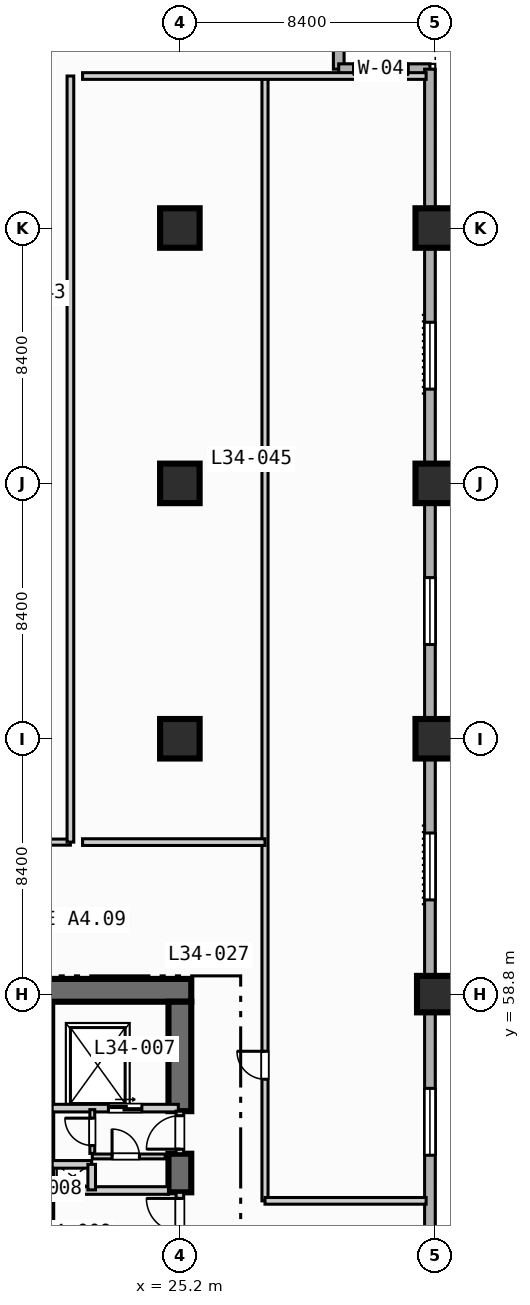
"""IFC4 building model, lengths in metres.
Left out: names, types, materials, properties, quantities, classifications, styles, units other than length and angle.
Written with IfcOpenShell. Run it as: python <this file> out.ifc"""

import sys

from ifc_helpers import new_model, si_unit, direction, frame, frame_2d, origin, origin_2d, place, context, subcontext, project, spatial, rectangle, extrude, element, fill, save


model = new_model("IFC4")
c1 = context("Model", 3, precision=1e-05, world=origin(), true_north=direction((0.0, 1.0)))
c2 = subcontext(c1, "Body", "Model", "MODEL_VIEW")
j1 = project(units=[si_unit("LENGTHUNIT", "METRE"), si_unit("PLANEANGLEUNIT", "RADIAN")], contexts=[c1])
p1 = place(None, origin())
s1 = spatial("IfcSite", under=j1, at=p1, CompositionType="ELEMENT")
p2 = place(p1, origin())
s2 = spatial("IfcBuilding", under=s1, at=p2, CompositionType="ELEMENT")
p3 = place(p2, frame((0.0, 0.0, 141.8)))
s3 = spatial("IfcBuildingStorey", under=s2, at=p3, CompositionType="ELEMENT", Elevation=141.8)
p4 = place(p3, frame((20.5, 58.925, 0.0), z_axis=(0.0, 0.0, 1.0), x_axis=(1.0, 0.0, 0.0)))
e1 = element("IfcWall", 1, at=p4, inside=s3, PredefinedType="SHEAR", context=c2, shape_type="SweptSolid", body=[
    extrude(rectangle(XDim=5.075, YDim=0.75, at=frame_2d((2.538, 0.0))), origin(), (0.0, 0.0, 1.0), 3.55),
])
p5 = place(p3, frame((25.2, 52.28, 0.0), z_axis=(0.0, 0.0, 1.0), x_axis=(0.0, 1.0, 0.0)))
e2 = element("IfcWall", 2, at=p5, inside=s3, PredefinedType="SHEAR", context=c2, shape_type="SweptSolid", body=[
    extrude(rectangle(XDim=1.27, YDim=0.75, at=frame_2d((0.635, 0.0))), origin(), (0.0, 0.0, 1.0), 3.55),
])
p6 = place(p3, frame((25.2, 54.95, 0.0), z_axis=(0.0, 0.0, 1.0), x_axis=(0.0, 1.0, 0.0)))
e3 = element("IfcWall", 3, at=p6, inside=s3, PredefinedType="SHEAR", context=c2, shape_type="SweptSolid", body=[
    extrude(rectangle(XDim=3.6, YDim=0.75, at=frame_2d((1.8, 0.0))), origin(), (0.0, 0.0, 1.0), 3.55),
])
for number, where, z_axis, x_axis in (
    (4, (25.2, 67.2, 0.0), (0.0, 0.0, 1.0), (1.0, 0.0, 0.0)),
    (5, (25.2, 75.6, 0.0), (0.0, 0.0, 1.0), (1.0, 0.0, 0.0)),
    (6, (25.2, 84.0, 0.0), (0.0, 0.0, 1.0), (1.0, 0.0, 0.0)),
):
    element("IfcColumn", number, at=place(p3, frame(where, z_axis=z_axis, x_axis=x_axis)), inside=s3, PredefinedType="COLUMN", context=c2, shape_type="SweptSolid", body=[
        extrude(rectangle(XDim=1.3, YDim=1.3, at=origin_2d()), origin(), (0.0, 0.0, 1.0), 3.8),
    ])
p7 = place(p3, frame((33.6, 58.8, 0.0), z_axis=(0.0, 0.0, 1.0), x_axis=(1.0, 0.0, 0.0)))
e7 = element("IfcColumn", 7, at=p7, inside=s3, PredefinedType="COLUMN", context=c2, shape_type="SweptSolid", body=[
    extrude(rectangle(XDim=1.2, YDim=1.2, at=origin_2d()), origin(), (0.0, 0.0, 1.0), 3.8),
])
for number, where, z_axis, x_axis in (
    (8, (33.6, 67.2, 0.0), (0.0, 0.0, 1.0), (1.0, 0.0, 0.0)),
    (9, (33.6, 75.6, 0.0), (0.0, 0.0, 1.0), (1.0, 0.0, 0.0)),
    (10, (33.6, 84.0, 0.0), (0.0, 0.0, 1.0), (1.0, 0.0, 0.0)),
):
    element("IfcColumn", number, at=place(p3, frame(where, z_axis=z_axis, x_axis=x_axis)), inside=s3, PredefinedType="COLUMN", context=c2, shape_type="SweptSolid", body=[
        extrude(rectangle(XDim=1.3, YDim=1.3, at=origin_2d()), origin(), (0.0, 0.0, 1.0), 3.8),
    ])
p8 = place(p3, frame((30.425, 92.225, 0.0), z_axis=(0.0, 0.0, 1.0), x_axis=(0.0, -1.0, 0.0)))
e11 = element("IfcWall", 11, at=p8, inside=s3, PredefinedType="STANDARD", context=c2, shape_type="SweptSolid", body=[
    extrude(rectangle(XDim=3.0, YDim=0.35, at=frame_2d((1.5, 0.0))), origin(), (0.0, 0.0, 1.0), 3.55),
])
p9 = place(p3, frame((30.425, 89.225, 0.0), z_axis=(0.0, 0.0, 1.0), x_axis=(1.0, 0.0, 0.0)))
e12 = element("IfcWall", 12, at=p9, inside=s3, PredefinedType="STANDARD", context=c2, shape_type="SweptSolid", body=[
    extrude(rectangle(XDim=3.0, YDim=0.35, at=frame_2d((1.5, 0.0))), origin(), (0.0, 0.0, 1.0), 3.55),
])
p10 = place(p9, frame((0.488, 0.0, 0.85)))
e13 = element("IfcOpeningElement", 13, at=p10, cuts=e12, PredefinedType="OPENING", context=c2, shape_type="SweptSolid", body=[
    extrude(rectangle(XDim=1.8, YDim=1.8, at=frame_2d((0.9, 0.9))), frame((0.0, 0.185, 0.0), z_axis=(0.0, -1.0, 0.0), x_axis=(1.0, 0.0, 0.0)), (0.0, 0.0, 1.0), 0.37),
])
p11 = place(p3, frame((33.425, 89.225, 0.0), z_axis=(0.0, 0.0, 1.0), x_axis=(0.0, -1.0, 0.0)))
e14 = element("IfcWall", 14, at=p11, inside=s3, PredefinedType="STANDARD", context=c2, shape_type="SweptSolid", body=[
    extrude(rectangle(XDim=55.8, YDim=0.35, at=frame_2d((27.9, 0.0))), origin(), (0.0, 0.0, 1.0), 3.55),
])
p12 = place(p11, frame((50.325, 0.0, 0.85)))
e15 = element("IfcOpeningElement", 15, at=p12, cuts=e14, PredefinedType="OPENING", context=c2, shape_type="SweptSolid", body=[
    extrude(rectangle(XDim=2.2, YDim=1.8, at=frame_2d((1.1, 0.9))), frame((0.0, 0.185, 0.0), z_axis=(0.0, -1.0, 0.0), x_axis=(1.0, 0.0, 0.0)), (0.0, 0.0, 1.0), 0.37),
])
p13 = place(p11, frame((33.525, 0.0, 0.85)))
e16 = element("IfcOpeningElement", 16, at=p13, cuts=e14, PredefinedType="OPENING", context=c2, shape_type="SweptSolid", body=[
    extrude(rectangle(XDim=2.2, YDim=1.8, at=frame_2d((1.1, 0.9))), frame((0.0, 0.185, 0.0), z_axis=(0.0, -1.0, 0.0), x_axis=(1.0, 0.0, 0.0)), (0.0, 0.0, 1.0), 0.37),
])
p14 = place(p11, frame((25.125, 0.0, 0.85)))
e17 = element("IfcOpeningElement", 17, at=p14, cuts=e14, PredefinedType="OPENING", context=c2, shape_type="SweptSolid", body=[
    extrude(rectangle(XDim=2.2, YDim=1.8, at=frame_2d((1.1, 0.9))), frame((0.0, 0.185, 0.0), z_axis=(0.0, -1.0, 0.0), x_axis=(1.0, 0.0, 0.0)), (0.0, 0.0, 1.0), 0.37),
])
p15 = place(p11, frame((16.725, 0.0, 0.85)))
e18 = element("IfcOpeningElement", 18, at=p15, cuts=e14, PredefinedType="OPENING", context=c2, shape_type="SweptSolid", body=[
    extrude(rectangle(XDim=2.2, YDim=1.8, at=frame_2d((1.1, 0.9))), frame((0.0, 0.185, 0.0), z_axis=(0.0, -1.0, 0.0), x_axis=(1.0, 0.0, 0.0)), (0.0, 0.0, 1.0), 0.37),
])
p16 = place(p11, frame((8.325, 0.0, 0.85)))
e19 = element("IfcOpeningElement", 19, at=p16, cuts=e14, PredefinedType="OPENING", context=c2, shape_type="SweptSolid", body=[
    extrude(rectangle(XDim=2.2, YDim=1.8, at=frame_2d((1.1, 0.9))), frame((0.0, 0.185, 0.0), z_axis=(0.0, -1.0, 0.0), x_axis=(1.0, 0.0, 0.0)), (0.0, 0.0, 1.0), 0.37),
])
p17 = place(p3, frame((25.2, 50.8, 0.0), z_axis=(0.0, 0.0, 1.0), x_axis=(0.0, 1.0, 0.0)))
e20 = element("IfcWall", 20, at=p17, inside=s3, PredefinedType="SOLIDWALL", context=c2, shape_type="SweptSolid", body=[
    extrude(rectangle(XDim=1.48, YDim=0.25, at=frame_2d((0.74, 0.0))), origin(), (0.0, 0.0, 1.0), 3.55),
])
p18 = place(p17, frame((0.18, 0.0, 0.0)))
e21 = element("IfcOpeningElement", 21, at=p18, cuts=e20, PredefinedType="OPENING", context=c2, shape_type="SweptSolid", body=[
    extrude(rectangle(XDim=1.1, YDim=2.15, at=frame_2d((0.55, 1.075))), frame((0.0, 0.135, 0.0), z_axis=(0.0, -1.0, 0.0), x_axis=(1.0, 0.0, 0.0)), (0.0, 0.0, 1.0), 0.27),
])
p19 = place(p3, frame((21.0, 52.34, 0.0), z_axis=(0.0, 0.0, 1.0), x_axis=(1.0, 0.0, 0.0)))
e22 = element("IfcWall", 22, at=p19, inside=s3, PredefinedType="SOLIDWALL", context=c2, shape_type="SweptSolid", body=[
    extrude(rectangle(XDim=3.825, YDim=0.25, at=frame_2d((1.913, 0.0))), origin(), (0.0, 0.0, 1.0), 3.55),
])
p20 = place(p3, frame((21.0, 55.05, 0.0), z_axis=(0.0, 0.0, 1.0), x_axis=(1.0, 0.0, 0.0)))
e23 = element("IfcWall", 23, at=p20, inside=s3, PredefinedType="SOLIDWALL", context=c2, shape_type="SweptSolid", body=[
    extrude(rectangle(XDim=4.15, YDim=0.25, at=frame_2d((2.075, 0.0))), origin(), (0.0, 0.0, 1.0), 3.55),
])
p21 = place(p20, frame((1.85, 0.0, 0.0)))
e24 = element("IfcOpeningElement", 24, at=p21, cuts=e23, PredefinedType="OPENING", context=c2, shape_type="SweptSolid", body=[
    extrude(rectangle(XDim=1.1, YDim=2.15, at=frame_2d((0.55, 1.075))), frame((0.0, 0.135, 0.0), z_axis=(0.0, -1.0, 0.0), x_axis=(1.0, 0.0, 0.0)), (0.0, 0.0, 1.0), 0.27),
])
p22 = place(p3, frame((25.2, 53.55, 0.0), z_axis=(0.0, 0.0, 1.0), x_axis=(0.0, 1.0, 0.0)))
e25 = element("IfcWall", 25, at=p22, inside=s3, PredefinedType="SOLIDWALL", context=c2, shape_type="SweptSolid", body=[
    extrude(rectangle(XDim=1.4, YDim=0.25, at=frame_2d((0.7, 0.0))), origin(), (0.0, 0.0, 1.0), 3.55),
])
p23 = place(p22, frame((0.15, 0.0, 0.0)))
e26 = element("IfcOpeningElement", 26, at=p23, cuts=e25, PredefinedType="OPENING", context=c2, shape_type="SweptSolid", body=[
    extrude(rectangle(XDim=1.1, YDim=2.15, at=frame_2d((0.55, 1.075))), frame((0.0, 0.135, 0.0), z_axis=(0.0, -1.0, 0.0), x_axis=(1.0, 0.0, 0.0)), (0.0, 0.0, 1.0), 0.27),
])
p24 = place(p3, frame((21.0, 53.2, 0.0), z_axis=(0.0, 0.0, 1.0), x_axis=(1.0, 0.0, 0.0)))
e27 = element("IfcWall", 27, at=p24, inside=s3, PredefinedType="SOLIDWALL", context=c2, shape_type="SweptSolid", body=[
    extrude(rectangle(XDim=1.3, YDim=0.25, at=frame_2d((0.65, 0.0))), origin(), (0.0, 0.0, 1.0), 3.55),
])
p25 = place(p3, frame((22.3, 52.36, 0.0), z_axis=(0.0, 0.0, 1.0), x_axis=(0.0, 1.0, 0.0)))
e28 = element("IfcWall", 28, at=p25, inside=s3, PredefinedType="SOLIDWALL", context=c2, shape_type="SweptSolid", body=[
    extrude(rectangle(XDim=0.84, YDim=0.25, at=frame_2d((0.42, 0.0))), origin(), (0.0, 0.0, 1.0), 3.55),
])
p26 = place(p3, frame((22.32, 53.56, 0.0), z_axis=(0.0, 0.0, 1.0), x_axis=(0.0, 1.0, 0.0)))
e29 = element("IfcWall", 29, at=p26, inside=s3, PredefinedType="PARTITIONING", context=c2, shape_type="SweptSolid", body=[
    extrude(rectangle(XDim=1.44, YDim=0.16, at=frame_2d((0.72, 0.0))), origin(), (0.0, 0.0, 1.0), 3.55),
])
p27 = place(p26, frame((0.26, 0.0, 0.0)))
e30 = element("IfcOpeningElement", 30, at=p27, cuts=e29, PredefinedType="OPENING", context=c2, shape_type="SweptSolid", body=[
    extrude(rectangle(XDim=0.9, YDim=2.1, at=frame_2d((0.45, 1.05))), frame((0.0, 0.09, 0.0), z_axis=(0.0, -1.0, 0.0), x_axis=(1.0, 0.0, 0.0)), (0.0, 0.0, 1.0), 0.18),
])
p28 = place(p3, frame((22.32, 53.46, 0.0), z_axis=(0.0, 0.0, 1.0), x_axis=(1.0, 0.0, 0.0)))
e31 = element("IfcWall", 31, at=p28, inside=s3, PredefinedType="PARTITIONING", context=c2, shape_type="SweptSolid", body=[
    extrude(rectangle(XDim=2.4, YDim=0.16, at=frame_2d((1.2, 0.0))), origin(), (0.0, 0.0, 1.0), 3.55),
])
p29 = place(p28, frame((0.65, 0.0, 0.0)))
e32 = element("IfcOpeningElement", 32, at=p29, cuts=e31, PredefinedType="OPENING", context=c2, shape_type="SweptSolid", body=[
    extrude(rectangle(XDim=0.9, YDim=2.1, at=frame_2d((0.45, 1.05))), frame((0.0, 0.09, 0.0), z_axis=(0.0, -1.0, 0.0), x_axis=(1.0, 0.0, 0.0)), (0.0, 0.0, 1.0), 0.18),
])
p30 = place(p3, frame((3.4, 63.8, 0.0), z_axis=(0.0, 0.0, 1.0), x_axis=(1.0, 0.0, 0.0)))
e33 = element("IfcWall", 33, at=p30, inside=s3, PredefinedType="PARTITIONING", context=c2, shape_type="SweptSolid", body=[
    extrude(rectangle(XDim=18.2, YDim=0.2, at=frame_2d((9.1, 0.0))), origin(), (0.0, 0.0, 1.0), 3.55),
])
p31 = place(p30, frame((4.05, 0.0, 0.0)))
e34 = element("IfcOpeningElement", 34, at=p31, cuts=e33, PredefinedType="OPENING", context=c2, shape_type="SweptSolid", body=[
    extrude(rectangle(XDim=1.0, YDim=2.15, at=frame_2d((0.5, 1.075))), frame((0.0, 0.11, 0.0), z_axis=(0.0, -1.0, 0.0), x_axis=(1.0, 0.0, 0.0)), (0.0, 0.0, 1.0), 0.22),
])
p32 = place(p3, frame((21.6, 63.8, 0.0), z_axis=(0.0, 0.0, 1.0), x_axis=(0.0, 1.0, 0.0)))
e35 = element("IfcWall", 35, at=p32, inside=s3, PredefinedType="PARTITIONING", context=c2, shape_type="SweptSolid", body=[
    extrude(rectangle(XDim=25.2, YDim=0.22, at=frame_2d((12.6, 0.0))), origin(), (0.0, 0.0, 1.0), 3.55),
])
p33 = place(p3, frame((28.0, 52.0, 0.0), z_axis=(0.0, 0.0, 1.0), x_axis=(0.0, 1.0, 0.0)))
e36 = element("IfcWall", 36, at=p33, inside=s3, PredefinedType="PARTITIONING", context=c2, shape_type="SweptSolid", body=[
    extrude(rectangle(XDim=37.0, YDim=0.2, at=frame_2d((18.5, 0.0))), origin(), (0.0, 0.0, 1.0), 3.55),
])
p34 = place(p33, frame((4.0, 0.0, 0.0)))
e37 = element("IfcOpeningElement", 37, at=p34, cuts=e36, PredefinedType="OPENING", context=c2, shape_type="SweptSolid", body=[
    extrude(rectangle(XDim=0.92, YDim=2.1, at=frame_2d((0.46, 1.05))), frame((0.0, 0.11, 0.0), z_axis=(0.0, -1.0, 0.0), x_axis=(1.0, 0.0, 0.0)), (0.0, 0.0, 1.0), 0.22),
])
p35 = place(p3, frame((28.0, 52.0, 0.0), z_axis=(0.0, 0.0, 1.0), x_axis=(1.0, 0.0, 0.0)))
e38 = element("IfcWall", 38, at=p35, inside=s3, PredefinedType="PARTITIONING", context=c2, shape_type="SweptSolid", body=[
    extrude(rectangle(XDim=5.3, YDim=0.22, at=frame_2d((2.65, 0.0))), origin(), (0.0, 0.0, 1.0), 3.55),
])
p36 = place(p3, frame((22.0, 89.0, 0.0), z_axis=(0.0, 0.0, 1.0), x_axis=(1.0, 0.0, 0.0)))
e39 = element("IfcWall", 39, at=p36, inside=s3, PredefinedType="PARTITIONING", context=c2, shape_type="SweptSolid", body=[
    extrude(rectangle(XDim=11.3, YDim=0.22, at=frame_2d((5.65, 0.0))), origin(), (0.0, 0.0, 1.0), 3.55),
])
p37 = place(p3, frame((22.0, 63.8, 0.0), z_axis=(0.0, 0.0, 1.0), x_axis=(1.0, 0.0, 0.0)))
e40 = element("IfcWall", 40, at=p37, inside=s3, PredefinedType="PARTITIONING", context=c2, shape_type="SweptSolid", body=[
    extrude(rectangle(XDim=6.0, YDim=0.22, at=frame_2d((3.0, 0.0))), origin(), (0.0, 0.0, 1.0), 3.55),
])
p38 = place(p10, origin())
e41 = element("IfcWindow", 41, at=p38, inside=s3, PartitioningType="SINGLE_PANEL", PredefinedType="WINDOW", context=c2, shape_type="SweptSolid", body=[
    extrude(rectangle(XDim=1.8, YDim=1.8, at=frame_2d((0.9, 0.9))), frame((0.0, 0.03, 0.0), z_axis=(0.0, -1.0, 0.0), x_axis=(1.0, 0.0, 0.0)), (0.0, 0.0, 1.0), 0.06),
])
fill(e13, e41)
p39 = place(p13, origin())
e42 = element("IfcWindow", 42, at=p39, inside=s3, PartitioningType="SINGLE_PANEL", PredefinedType="WINDOW", context=c2, shape_type="SweptSolid", body=[
    extrude(rectangle(XDim=2.2, YDim=1.8, at=frame_2d((1.1, 0.9))), frame((0.0, 0.03, 0.0), z_axis=(0.0, -1.0, 0.0), x_axis=(1.0, 0.0, 0.0)), (0.0, 0.0, 1.0), 0.06),
])
fill(e16, e42)
p40 = place(p14, origin())
e43 = element("IfcWindow", 43, at=p40, inside=s3, PartitioningType="SINGLE_PANEL", PredefinedType="WINDOW", context=c2, shape_type="SweptSolid", body=[
    extrude(rectangle(XDim=2.2, YDim=1.8, at=frame_2d((1.1, 0.9))), frame((0.0, 0.03, 0.0), z_axis=(0.0, -1.0, 0.0), x_axis=(1.0, 0.0, 0.0)), (0.0, 0.0, 1.0), 0.06),
])
fill(e17, e43)
p41 = place(p15, origin())
e44 = element("IfcWindow", 44, at=p41, inside=s3, PartitioningType="SINGLE_PANEL", PredefinedType="WINDOW", context=c2, shape_type="SweptSolid", body=[
    extrude(rectangle(XDim=2.2, YDim=1.8, at=frame_2d((1.1, 0.9))), frame((0.0, 0.03, 0.0), z_axis=(0.0, -1.0, 0.0), x_axis=(1.0, 0.0, 0.0)), (0.0, 0.0, 1.0), 0.06),
])
fill(e18, e44)
p42 = place(p16, origin())
e45 = element("IfcWindow", 45, at=p42, inside=s3, PartitioningType="SINGLE_PANEL", PredefinedType="WINDOW", context=c2, shape_type="SweptSolid", body=[
    extrude(rectangle(XDim=2.2, YDim=1.8, at=frame_2d((1.1, 0.9))), frame((0.0, 0.03, 0.0), z_axis=(0.0, -1.0, 0.0), x_axis=(1.0, 0.0, 0.0)), (0.0, 0.0, 1.0), 0.06),
])
fill(e19, e45)
p43 = place(p18, origin())
e46 = element("IfcDoor", 46, at=p43, inside=s3, OperationType="SINGLE_SWING_RIGHT", PredefinedType="DOOR", context=c2, shape_type="SweptSolid", body=[
    extrude(rectangle(XDim=1.1, YDim=2.15, at=frame_2d((0.55, 1.075))), frame((0.0, 0.025, 0.0), z_axis=(0.0, -1.0, 0.0), x_axis=(1.0, 0.0, 0.0)), (0.0, 0.0, 1.0), 0.05),
])
fill(e21, e46)
p44 = place(p21, origin())
e47 = element("IfcDoor", 47, at=p44, inside=s3, OperationType="SLIDING_TO_LEFT", PredefinedType="DOOR", context=c2, shape_type="SweptSolid", body=[
    extrude(rectangle(XDim=1.1, YDim=2.15, at=frame_2d((0.55, 1.075))), frame((0.0, 0.025, 0.0), z_axis=(0.0, -1.0, 0.0), x_axis=(1.0, 0.0, 0.0)), (0.0, 0.0, 1.0), 0.05),
])
fill(e24, e47)
p45 = place(p23, origin())
e48 = element("IfcDoor", 48, at=p45, inside=s3, OperationType="SINGLE_SWING_LEFT", PredefinedType="DOOR", context=c2, shape_type="SweptSolid", body=[
    extrude(rectangle(XDim=1.1, YDim=2.15, at=frame_2d((0.55, 1.075))), frame((0.0, 0.025, 0.0), z_axis=(0.0, -1.0, 0.0), x_axis=(1.0, 0.0, 0.0)), (0.0, 0.0, 1.0), 0.05),
])
fill(e26, e48)
p46 = place(p27, origin())
e49 = element("IfcDoor", 49, at=p46, inside=s3, OperationType="SINGLE_SWING_RIGHT", PredefinedType="DOOR", context=c2, shape_type="SweptSolid", body=[
    extrude(rectangle(XDim=0.9, YDim=2.1, at=frame_2d((0.45, 1.05))), frame((0.0, 0.025, 0.0), z_axis=(0.0, -1.0, 0.0), x_axis=(1.0, 0.0, 0.0)), (0.0, 0.0, 1.0), 0.05),
])
fill(e30, e49)
p47 = place(p29, origin())
e50 = element("IfcDoor", 50, at=p47, inside=s3, OperationType="SINGLE_SWING_LEFT", PredefinedType="DOOR", context=c2, shape_type="SweptSolid", body=[
    extrude(rectangle(XDim=0.9, YDim=2.1, at=frame_2d((0.45, 1.05))), frame((0.0, 0.025, 0.0), z_axis=(0.0, -1.0, 0.0), x_axis=(1.0, 0.0, 0.0)), (0.0, 0.0, 1.0), 0.05),
])
fill(e32, e50)
p48 = place(p34, origin())
e51 = element("IfcDoor", 51, at=p48, inside=s3, OperationType="SINGLE_SWING_RIGHT", PredefinedType="DOOR", context=c2, shape_type="SweptSolid", body=[
    extrude(rectangle(XDim=0.92, YDim=2.1, at=frame_2d((0.46, 1.05))), frame((0.0, 0.025, 0.0), z_axis=(0.0, -1.0, 0.0), x_axis=(1.0, 0.0, 0.0)), (0.0, 0.0, 1.0), 0.05),
])
fill(e37, e51)
save(model, sys.argv[1])
